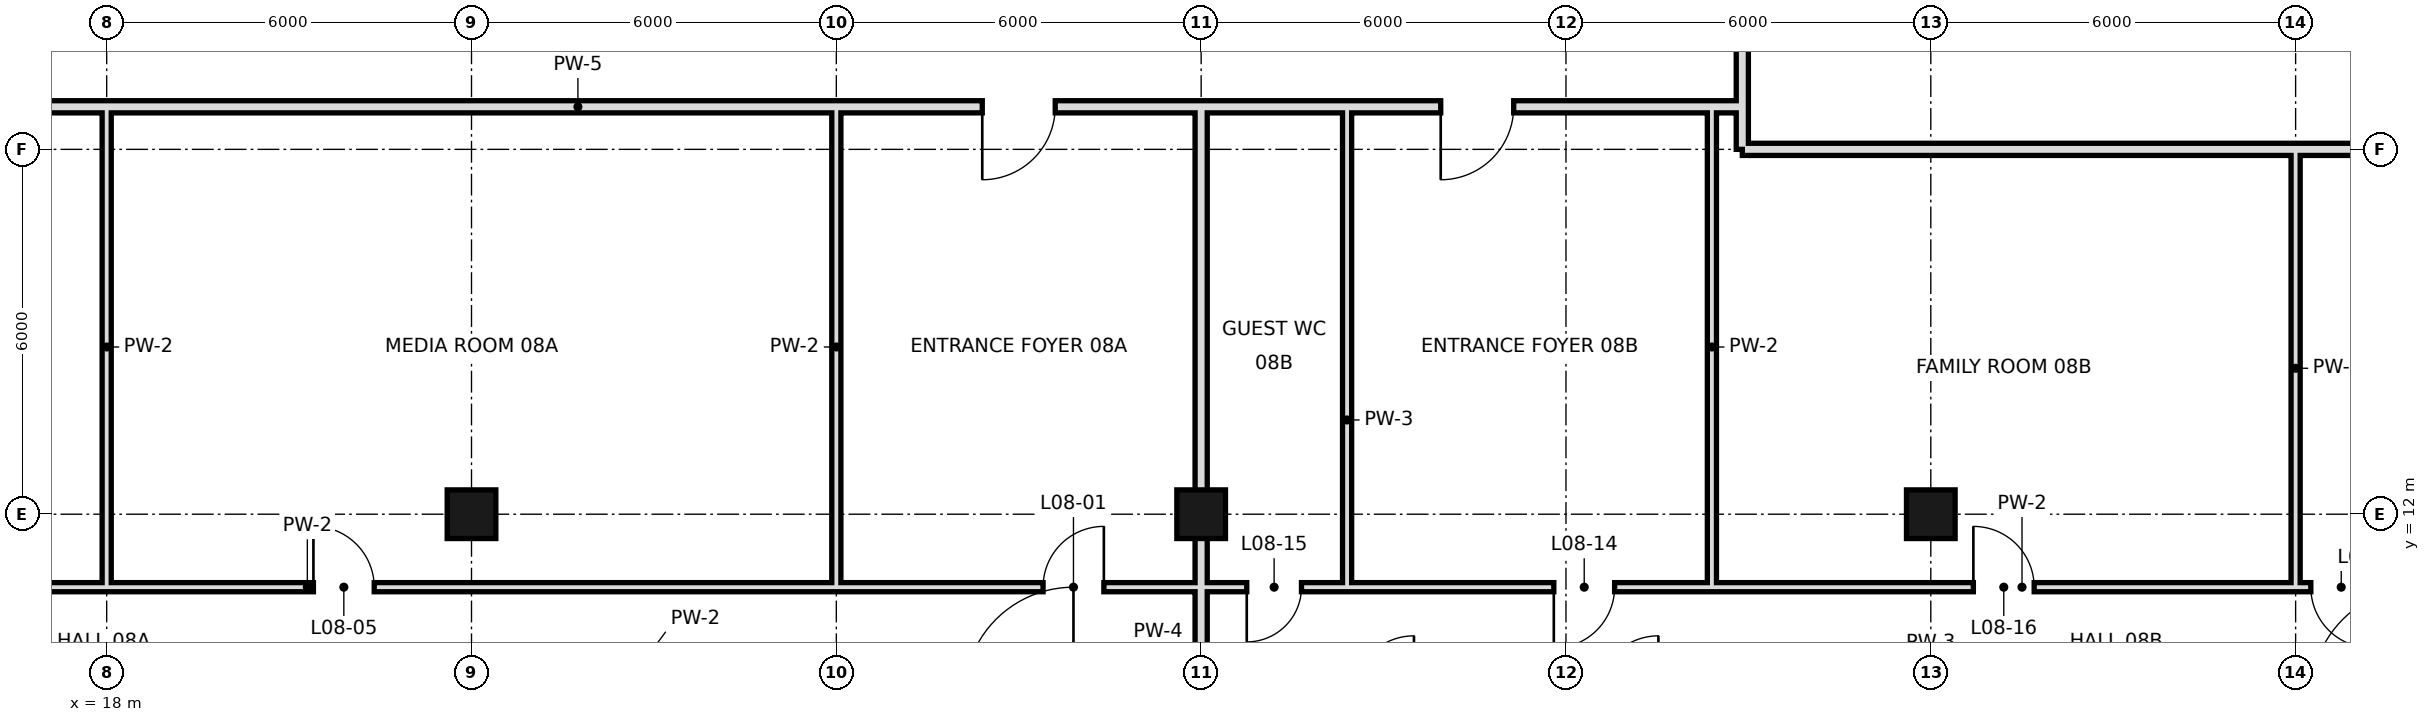
"""IFC4 building model, lengths in metres.
Left out: names, types, materials, properties, quantities, classifications, styles, units other than length and angle.
Written with IfcOpenShell. Run it as: python <this file> out.ifc"""

import sys

from ifc_helpers import new_model, si_unit, direction, frame, frame_2d, origin, origin_2d, place, context, subcontext, project, spatial, rectangle, hollow_rectangle, extrude, element, fill, save


model = new_model("IFC4")
c1 = context("Model", 3, precision=1e-05, world=origin(), true_north=direction((0.0, 1.0)))
c2 = subcontext(c1, "Body", "Model", "MODEL_VIEW")
j1 = project(units=[si_unit("LENGTHUNIT", "METRE"), si_unit("PLANEANGLEUNIT", "RADIAN")], contexts=[c1])
p1 = place(None, origin())
s1 = spatial("IfcSite", under=j1, at=p1, CompositionType="ELEMENT")
p2 = place(p1, origin())
s2 = spatial("IfcBuilding", under=s1, at=p2, CompositionType="ELEMENT")
p3 = place(p2, frame((0.0, 0.0, 49.8)))
s3 = spatial("IfcBuildingStorey", under=s2, at=p3, CompositionType="ELEMENT", Elevation=49.8)
for number, where, z_axis, x_axis in (
    (1, (24.0, 12.0, 0.0), (0.0, 0.0, 1.0), (1.0, 0.0, 0.0)),
    (2, (36.0, 12.0, 0.0), (0.0, 0.0, 1.0), (1.0, 0.0, 0.0)),
    (3, (48.0, 12.0, 0.0), (0.0, 0.0, 1.0), (1.0, 0.0, 0.0)),
):
    element("IfcColumn", number, at=place(p3, frame(where, z_axis=z_axis, x_axis=x_axis)), inside=s3, PredefinedType="COLUMN", context=c2, shape_type="SweptSolid", body=[
        extrude(hollow_rectangle(XDim=0.8, YDim=0.8, WallThickness=0.04, at=origin_2d()), origin(), (0.0, 0.0, 1.0), 3.6),
    ])
for number, where, z_axis, x_axis in (
    (4, (18.0, 10.8, 0.0), (0.0, 0.0, 1.0), (0.0, 1.0, 0.0)),
    (5, (30.0, 10.8, 0.0), (0.0, 0.0, 1.0), (0.0, 1.0, 0.0)),
):
    element("IfcWall", number, at=place(p3, frame(where, z_axis=z_axis, x_axis=x_axis)), inside=s3, PredefinedType="PARTITIONING", context=c2, shape_type="SweptSolid", body=[
        extrude(rectangle(XDim=7.9, YDim=0.15, at=frame_2d((3.95, 0.0))), origin(), (0.0, 0.0, 1.0), 2.72),
    ])
p4 = place(p3, frame((36.0, 0.0, 0.0), z_axis=(0.0, 0.0, 1.0), x_axis=(0.0, 1.0, 0.0)))
e6 = element("IfcWall", 6, at=p4, inside=s3, PredefinedType="SOLIDWALL", context=c2, shape_type="SweptSolid", body=[
    extrude(rectangle(XDim=18.7, YDim=0.2, at=frame_2d((9.35, 0.0))), origin(), (0.0, 0.0, 1.0), 2.72),
])
for number, where, z_axis, x_axis in (
    (7, (38.4, 10.8, 0.0), (0.0, 0.0, 1.0), (0.0, 1.0, 0.0)),
    (8, (44.4, 10.8, 0.0), (0.0, 0.0, 1.0), (0.0, 1.0, 0.0)),
):
    element("IfcWall", number, at=place(p3, frame(where, z_axis=z_axis, x_axis=x_axis)), inside=s3, PredefinedType="PARTITIONING", context=c2, shape_type="SweptSolid", body=[
        extrude(rectangle(XDim=7.9, YDim=0.15, at=frame_2d((3.95, 0.0))), origin(), (0.0, 0.0, 1.0), 3.42),
    ])
p5 = place(p3, frame((44.9, 18.0, 0.0), z_axis=(0.0, 0.0, 1.0), x_axis=(0.0, 1.0, 0.0)))
e9 = element("IfcWall", 9, at=p5, inside=s3, PredefinedType="SOLIDWALL", context=c2, shape_type="SweptSolid", body=[
    extrude(rectangle(XDim=3.6, YDim=0.2, at=frame_2d((1.8, 0.0))), origin(), (0.0, 0.0, 1.0), 2.97),
])
p6 = place(p3, frame((54.0, 10.8, 0.0), z_axis=(0.0, 0.0, 1.0), x_axis=(0.0, 1.0, 0.0)))
e10 = element("IfcWall", 10, at=p6, inside=s3, PredefinedType="PARTITIONING", context=c2, shape_type="SweptSolid", body=[
    extrude(rectangle(XDim=7.2, YDim=0.15, at=frame_2d((3.6, 0.0))), origin(), (0.0, 0.0, 1.0), 3.42),
])
p7 = place(p3, frame((6.6, 10.8, 0.0), z_axis=(0.0, 0.0, 1.0), x_axis=(1.0, 0.0, 0.0)))
e11 = element("IfcWall", 11, at=p7, inside=s3, PredefinedType="PARTITIONING", context=c2, shape_type="SweptSolid", body=[
    extrude(rectangle(XDim=29.4, YDim=0.15, at=frame_2d((14.7, 0.0))), origin(), (0.0, 0.0, 1.0), 3.42),
])
p8 = place(p7, frame((26.8, 0.0, 0.0)))
e12 = element("IfcOpeningElement", 12, at=p8, cuts=e11, PredefinedType="OPENING", context=c2, shape_type="SweptSolid", body=[
    extrude(rectangle(XDim=1.0, YDim=2.4, at=frame_2d((0.5, 1.2))), frame((0.0, 0.085, 0.0), z_axis=(0.0, -1.0, 0.0), x_axis=(1.0, 0.0, 0.0)), (0.0, 0.0, 1.0), 0.17),
])
p9 = place(p7, frame((3.22, 0.0, 0.0)))
e13 = element("IfcOpeningElement", 13, at=p9, cuts=e11, PredefinedType="OPENING", context=c2, shape_type="SweptSolid", body=[
    extrude(rectangle(XDim=1.0, YDim=2.4, at=frame_2d((0.5, 1.2))), frame((0.0, 0.085, 0.0), z_axis=(0.0, -1.0, 0.0), x_axis=(1.0, 0.0, 0.0)), (0.0, 0.0, 1.0), 0.17),
])
p10 = place(p7, frame((14.8, 0.0, 0.0)))
e14 = element("IfcOpeningElement", 14, at=p10, cuts=e11, PredefinedType="OPENING", context=c2, shape_type="SweptSolid", body=[
    extrude(rectangle(XDim=1.0, YDim=2.4, at=frame_2d((0.5, 1.2))), frame((0.0, 0.085, 0.0), z_axis=(0.0, -1.0, 0.0), x_axis=(1.0, 0.0, 0.0)), (0.0, 0.0, 1.0), 0.17),
])
p11 = place(p3, frame((38.4, 10.8, 0.0), z_axis=(0.0, 0.0, 1.0), x_axis=(1.0, 0.0, 0.0)))
e15 = element("IfcWall", 15, at=p11, inside=s3, PredefinedType="PARTITIONING", context=c2, shape_type="SweptSolid", body=[
    extrude(rectangle(XDim=22.2, YDim=0.15, at=frame_2d((11.1, 0.0))), origin(), (0.0, 0.0, 1.0), 3.42),
])
p12 = place(p11, frame((3.4, 0.0, 0.0)))
e16 = element("IfcOpeningElement", 16, at=p12, cuts=e15, PredefinedType="OPENING", context=c2, shape_type="SweptSolid", body=[
    extrude(rectangle(XDim=1.0, YDim=2.4, at=frame_2d((0.5, 1.2))), frame((0.0, 0.085, 0.0), z_axis=(0.0, -1.0, 0.0), x_axis=(1.0, 0.0, 0.0)), (0.0, 0.0, 1.0), 0.17),
])
p13 = place(p11, frame((10.3, 0.0, 0.0)))
e17 = element("IfcOpeningElement", 17, at=p13, cuts=e15, PredefinedType="OPENING", context=c2, shape_type="SweptSolid", body=[
    extrude(rectangle(XDim=1.0, YDim=2.4, at=frame_2d((0.5, 1.2))), frame((0.0, 0.085, 0.0), z_axis=(0.0, -1.0, 0.0), x_axis=(1.0, 0.0, 0.0)), (0.0, 0.0, 1.0), 0.17),
])
p14 = place(p11, frame((15.85, 0.0, 0.0)))
e18 = element("IfcOpeningElement", 18, at=p14, cuts=e15, PredefinedType="OPENING", context=c2, shape_type="SweptSolid", body=[
    extrude(rectangle(XDim=1.0, YDim=2.4, at=frame_2d((0.5, 1.2))), frame((0.0, 0.085, 0.0), z_axis=(0.0, -1.0, 0.0), x_axis=(1.0, 0.0, 0.0)), (0.0, 0.0, 1.0), 0.17),
])
p15 = place(p3, frame((36.0, 10.8, 0.0), z_axis=(0.0, 0.0, 1.0), x_axis=(1.0, 0.0, 0.0)))
e19 = element("IfcWall", 19, at=p15, inside=s3, PredefinedType="PARTITIONING", context=c2, shape_type="SweptSolid", body=[
    extrude(rectangle(XDim=2.4, YDim=0.15, at=frame_2d((1.2, 0.0))), origin(), (0.0, 0.0, 1.0), 3.42),
])
p16 = place(p15, frame((0.75, 0.0, 0.0)))
e20 = element("IfcOpeningElement", 20, at=p16, cuts=e19, PredefinedType="OPENING", context=c2, shape_type="SweptSolid", body=[
    extrude(rectangle(XDim=0.9, YDim=2.4, at=frame_2d((0.45, 1.2))), frame((0.0, 0.085, 0.0), z_axis=(0.0, -1.0, 0.0), x_axis=(1.0, 0.0, 0.0)), (0.0, 0.0, 1.0), 0.17),
])
p17 = place(p3, frame((44.9, 18.0, 0.0), z_axis=(0.0, 0.0, 1.0), x_axis=(1.0, 0.0, 0.0)))
e21 = element("IfcWall", 21, at=p17, inside=s3, PredefinedType="SOLIDWALL", context=c2, shape_type="SweptSolid", body=[
    extrude(rectangle(XDim=10.3, YDim=0.2, at=frame_2d((5.15, 0.0))), origin(), (0.0, 0.0, 1.0), 2.52),
])
p18 = place(p3, frame((6.6, 18.7, 0.0), z_axis=(0.0, 0.0, 1.0), x_axis=(1.0, 0.0, 0.0)))
e22 = element("IfcWall", 22, at=p18, inside=s3, PredefinedType="SOLIDWALL", context=c2, shape_type="SweptSolid", body=[
    extrude(rectangle(XDim=38.3, YDim=0.2, at=frame_2d((19.15, 0.0))), origin(), (0.0, 0.0, 1.0), 2.72),
])
p19 = place(p18, frame((25.8, 0.0, 0.0)))
e23 = element("IfcOpeningElement", 23, at=p19, cuts=e22, PredefinedType="OPENING", context=c2, shape_type="SweptSolid", body=[
    extrude(rectangle(XDim=1.2, YDim=2.4, at=frame_2d((0.6, 1.2))), frame((0.0, 0.11, 0.0), z_axis=(0.0, -1.0, 0.0), x_axis=(1.0, 0.0, 0.0)), (0.0, 0.0, 1.0), 0.22),
])
p20 = place(p18, frame((33.34, 0.0, 0.0)))
e24 = element("IfcOpeningElement", 24, at=p20, cuts=e22, PredefinedType="OPENING", context=c2, shape_type="SweptSolid", body=[
    extrude(rectangle(XDim=1.2, YDim=2.4, at=frame_2d((0.6, 1.2))), frame((0.0, 0.11, 0.0), z_axis=(0.0, -1.0, 0.0), x_axis=(1.0, 0.0, 0.0)), (0.0, 0.0, 1.0), 0.22),
])
p21 = place(p8, frame((1.0, 0.0, 0.0), z_axis=(0.0, 0.0, 1.0), x_axis=(-1.0, 0.0, 0.0)))
e25 = element("IfcDoor", 25, at=p21, inside=s3, OperationType="SINGLE_SWING_LEFT", PredefinedType="DOOR", context=c2, shape_type="SweptSolid", body=[
    extrude(rectangle(XDim=1.0, YDim=2.4, at=frame_2d((0.5, 1.2))), frame((0.0, 0.025, 0.0), z_axis=(0.0, -1.0, 0.0), x_axis=(1.0, 0.0, 0.0)), (0.0, 0.0, 1.0), 0.05),
])
fill(e12, e25)
p22 = place(p10, origin())
e26 = element("IfcDoor", 26, at=p22, inside=s3, OperationType="SINGLE_SWING_LEFT", PredefinedType="DOOR", context=c2, shape_type="SweptSolid", body=[
    extrude(rectangle(XDim=1.0, YDim=2.4, at=frame_2d((0.5, 1.2))), frame((0.0, 0.025, 0.0), z_axis=(0.0, -1.0, 0.0), x_axis=(1.0, 0.0, 0.0)), (0.0, 0.0, 1.0), 0.05),
])
fill(e14, e26)
p23 = place(p12, frame((1.0, 0.0, 0.0), z_axis=(0.0, 0.0, 1.0), x_axis=(-1.0, 0.0, 0.0)))
e27 = element("IfcDoor", 27, at=p23, inside=s3, OperationType="SINGLE_SWING_RIGHT", PredefinedType="DOOR", context=c2, shape_type="SweptSolid", body=[
    extrude(rectangle(XDim=1.0, YDim=2.4, at=frame_2d((0.5, 1.2))), frame((0.0, 0.025, 0.0), z_axis=(0.0, -1.0, 0.0), x_axis=(1.0, 0.0, 0.0)), (0.0, 0.0, 1.0), 0.05),
])
fill(e16, e27)
p24 = place(p16, frame((0.9, 0.0, 0.0), z_axis=(0.0, 0.0, 1.0), x_axis=(-1.0, 0.0, 0.0)))
e28 = element("IfcDoor", 28, at=p24, inside=s3, OperationType="SINGLE_SWING_RIGHT", PredefinedType="DOOR", context=c2, shape_type="SweptSolid", body=[
    extrude(rectangle(XDim=0.9, YDim=2.4, at=frame_2d((0.45, 1.2))), frame((0.0, 0.025, 0.0), z_axis=(0.0, -1.0, 0.0), x_axis=(1.0, 0.0, 0.0)), (0.0, 0.0, 1.0), 0.05),
])
fill(e20, e28)
p25 = place(p13, origin())
e29 = element("IfcDoor", 29, at=p25, inside=s3, OperationType="SINGLE_SWING_LEFT", PredefinedType="DOOR", context=c2, shape_type="SweptSolid", body=[
    extrude(rectangle(XDim=1.0, YDim=2.4, at=frame_2d((0.5, 1.2))), frame((0.0, 0.025, 0.0), z_axis=(0.0, -1.0, 0.0), x_axis=(1.0, 0.0, 0.0)), (0.0, 0.0, 1.0), 0.05),
])
fill(e17, e29)
p26 = place(p14, origin())
e30 = element("IfcDoor", 30, at=p26, inside=s3, OperationType="SINGLE_SWING_RIGHT", PredefinedType="DOOR", context=c2, shape_type="SweptSolid", body=[
    extrude(rectangle(XDim=1.0, YDim=2.4, at=frame_2d((0.5, 1.2))), frame((0.0, 0.025, 0.0), z_axis=(0.0, -1.0, 0.0), x_axis=(1.0, 0.0, 0.0)), (0.0, 0.0, 1.0), 0.05),
])
fill(e18, e30)
p27 = place(p19, frame((1.2, 0.0, 0.0), z_axis=(0.0, 0.0, 1.0), x_axis=(-1.0, 0.0, 0.0)))
e31 = element("IfcDoor", 31, at=p27, inside=s3, OperationType="SINGLE_SWING_RIGHT", PredefinedType="DOOR", context=c2, shape_type="SweptSolid", body=[
    extrude(rectangle(XDim=1.2, YDim=2.4, at=frame_2d((0.6, 1.2))), frame((0.0, 0.025, 0.0), z_axis=(0.0, -1.0, 0.0), x_axis=(1.0, 0.0, 0.0)), (0.0, 0.0, 1.0), 0.05),
])
fill(e23, e31)
p28 = place(p20, frame((1.2, 0.0, 0.0), z_axis=(0.0, 0.0, 1.0), x_axis=(-1.0, 0.0, 0.0)))
e32 = element("IfcDoor", 32, at=p28, inside=s3, OperationType="SINGLE_SWING_RIGHT", PredefinedType="DOOR", context=c2, shape_type="SweptSolid", body=[
    extrude(rectangle(XDim=1.2, YDim=2.4, at=frame_2d((0.6, 1.2))), frame((0.0, 0.025, 0.0), z_axis=(0.0, -1.0, 0.0), x_axis=(1.0, 0.0, 0.0)), (0.0, 0.0, 1.0), 0.05),
])
fill(e24, e32)
save(model, sys.argv[1])
